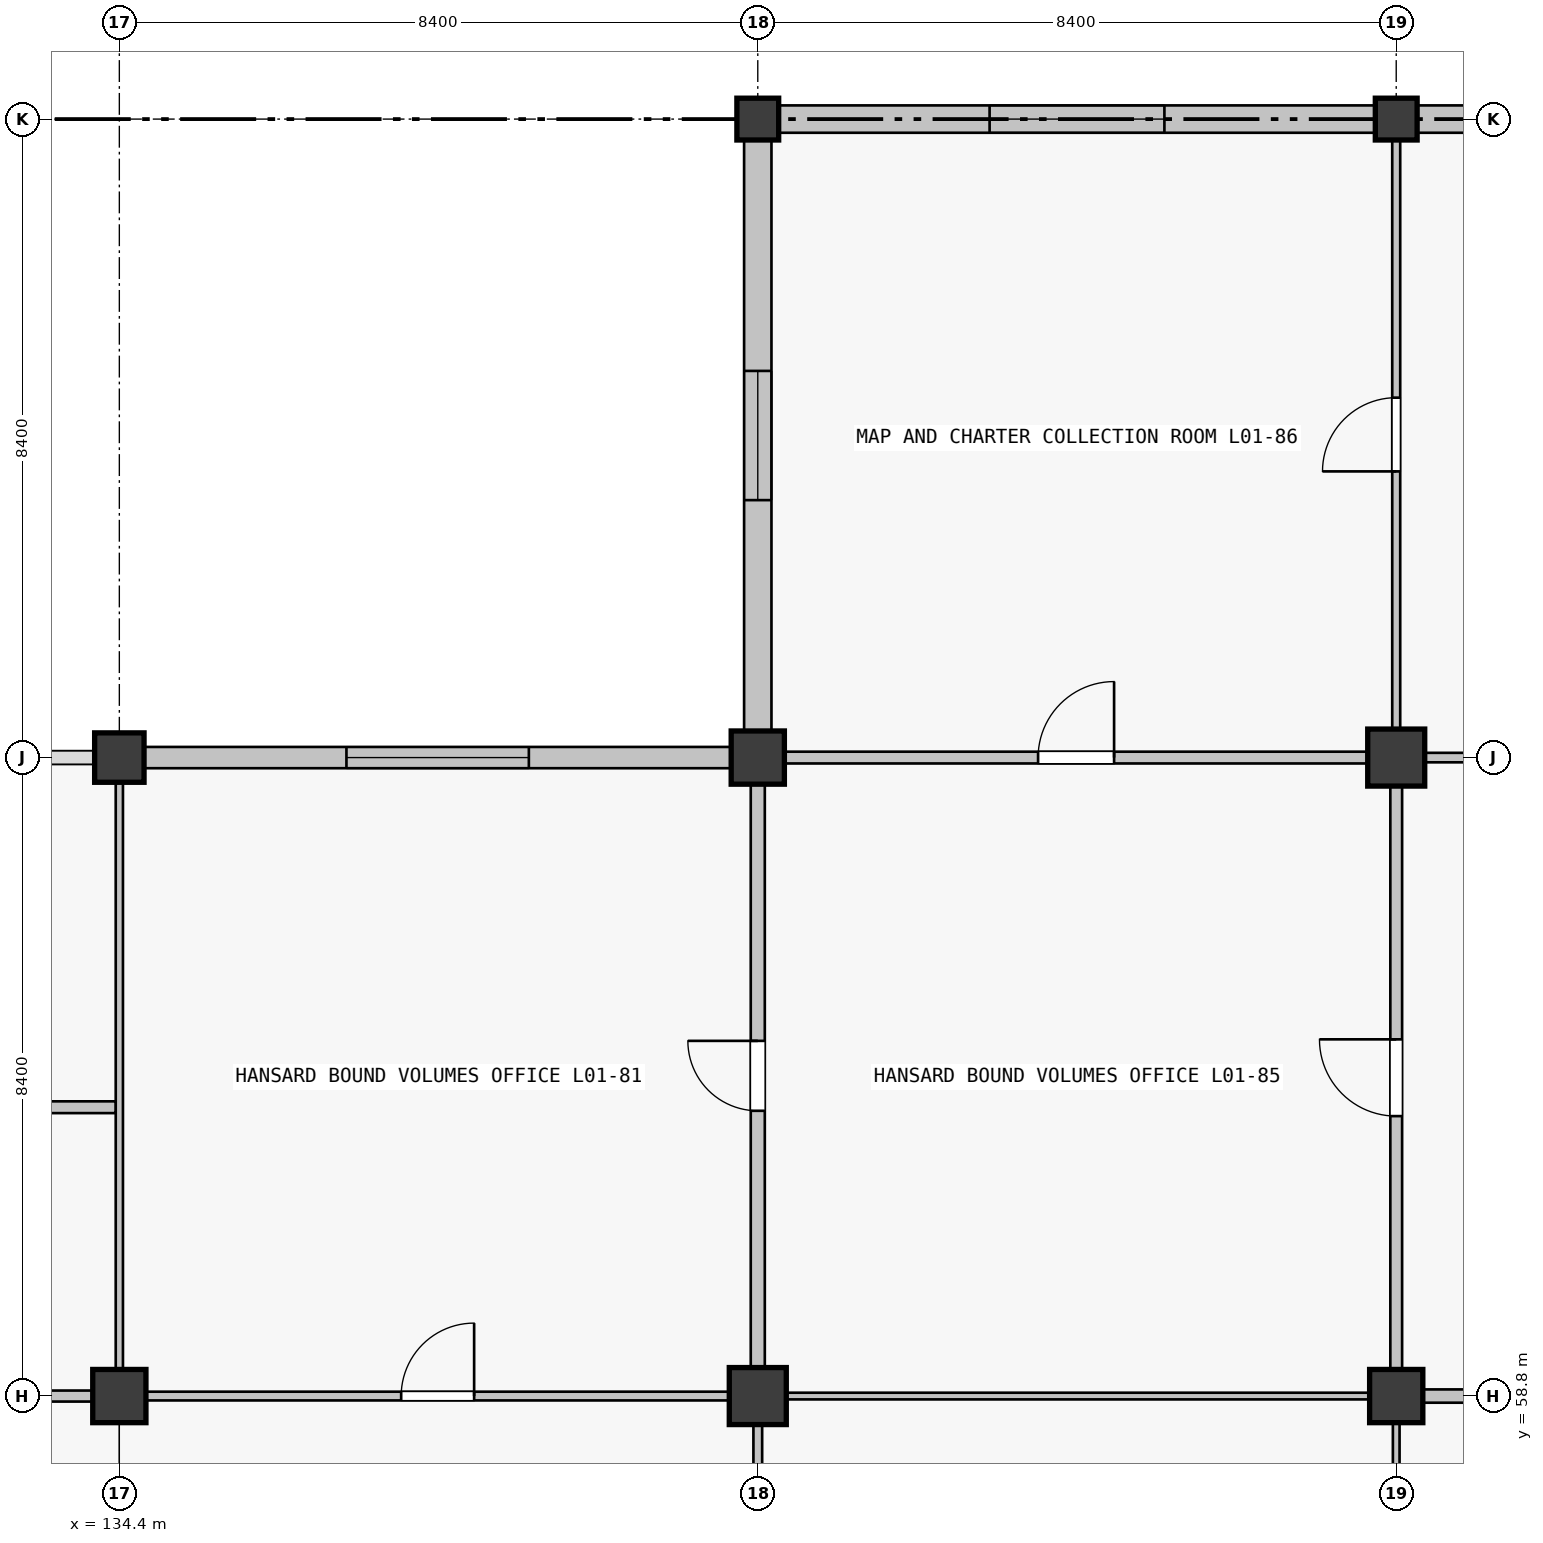
"""IFC4 building model, lengths in metres.
Left out: names, types, materials, properties, quantities, classifications, styles, units other than length and angle.
Written with IfcOpenShell. Run it as: python <this file> out.ifc"""

import sys

from ifc_helpers import new_model, si_unit, direction, frame, frame_2d, origin, origin_2d, place, context, subcontext, project, spatial, rectangle, extrude, element, fill, save


model = new_model("IFC4")
c1 = context("Model", 3, precision=1e-05, world=origin(), true_north=direction((0.0, 1.0)))
c2 = subcontext(c1, "Body", "Model", "MODEL_VIEW")
j1 = project(units=[si_unit("LENGTHUNIT", "METRE"), si_unit("PLANEANGLEUNIT", "RADIAN")], contexts=[c1])
p1 = place(None, origin())
s1 = spatial("IfcSite", under=j1, at=p1, CompositionType="ELEMENT")
p2 = place(p1, origin())
s2 = spatial("IfcBuilding", under=s1, at=p2, CompositionType="ELEMENT")
p3 = place(p2, frame((0.0, 0.0, 5.76)))
s3 = spatial("IfcBuildingStorey", under=s2, at=p3, CompositionType="ELEMENT", Elevation=5.76)
p4 = place(p3, frame((134.4, 58.8, 0.0), z_axis=(0.0, 0.0, 1.0), x_axis=(1.0, 0.0, 0.0)))
e1 = element("IfcColumn", 1, at=p4, inside=s3, PredefinedType="COLUMN", context=c2, shape_type="SweptSolid", body=[
    extrude(rectangle(XDim=0.7, YDim=0.7, at=origin_2d()), origin(), (0.0, 0.0, 1.0), 4.5),
])
p5 = place(p3, frame((134.4, 67.2, 0.0), z_axis=(0.0, 0.0, 1.0), x_axis=(1.0, 0.0, 0.0)))
e2 = element("IfcColumn", 2, at=p5, inside=s3, PredefinedType="COLUMN", context=c2, shape_type="SweptSolid", body=[
    extrude(rectangle(XDim=0.65, YDim=0.65, at=origin_2d()), origin(), (0.0, 0.0, 1.0), 4.5),
])
p6 = place(p3, frame((142.8, 58.8, 0.0), z_axis=(0.0, 0.0, 1.0), x_axis=(1.0, 0.0, 0.0)))
e3 = element("IfcColumn", 3, at=p6, inside=s3, PredefinedType="COLUMN", context=c2, shape_type="SweptSolid", body=[
    extrude(rectangle(XDim=0.75, YDim=0.75, at=origin_2d()), origin(), (0.0, 0.0, 1.0), 4.5),
])
p7 = place(p3, frame((142.8, 67.2, 0.0), z_axis=(0.0, 0.0, 1.0), x_axis=(1.0, 0.0, 0.0)))
e4 = element("IfcColumn", 4, at=p7, inside=s3, PredefinedType="COLUMN", context=c2, shape_type="SweptSolid", body=[
    extrude(rectangle(XDim=0.7, YDim=0.7, at=origin_2d()), origin(), (0.0, 0.0, 1.0), 4.5),
])
p8 = place(p3, frame((142.8, 75.6, 0.0), z_axis=(0.0, 0.0, 1.0), x_axis=(1.0, 0.0, 0.0)))
e5 = element("IfcColumn", 5, at=p8, inside=s3, PredefinedType="COLUMN", context=c2, shape_type="SweptSolid", body=[
    extrude(rectangle(XDim=0.55, YDim=0.55, at=origin_2d()), origin(), (0.0, 0.0, 1.0), 4.2),
])
p9 = place(p3, frame((151.2, 58.8, 0.0), z_axis=(0.0, 0.0, 1.0), x_axis=(1.0, 0.0, 0.0)))
e6 = element("IfcColumn", 6, at=p9, inside=s3, PredefinedType="COLUMN", context=c2, shape_type="SweptSolid", body=[
    extrude(rectangle(XDim=0.7, YDim=0.7, at=origin_2d()), origin(), (0.0, 0.0, 1.0), 4.5),
])
p10 = place(p3, frame((151.2, 67.2, 0.0), z_axis=(0.0, 0.0, 1.0), x_axis=(1.0, 0.0, 0.0)))
e7 = element("IfcColumn", 7, at=p10, inside=s3, PredefinedType="COLUMN", context=c2, shape_type="SweptSolid", body=[
    extrude(rectangle(XDim=0.75, YDim=0.75, at=origin_2d()), origin(), (0.0, 0.0, 1.0), 4.5),
])
p11 = place(p3, frame((151.2, 75.6, 0.0), z_axis=(0.0, 0.0, 1.0), x_axis=(1.0, 0.0, 0.0)))
e8 = element("IfcColumn", 8, at=p11, inside=s3, PredefinedType="COLUMN", context=c2, shape_type="SweptSolid", body=[
    extrude(rectangle(XDim=0.55, YDim=0.55, at=origin_2d()), origin(), (0.0, 0.0, 1.0), 4.2),
])
p12 = place(p3, frame((134.726, 67.2, 0.0), z_axis=(0.0, 0.0, 1.0), x_axis=(1.0, 0.0, 0.0)))
e9 = element("IfcWall", 9, at=p12, inside=s3, PredefinedType="SOLIDWALL", context=c2, shape_type="SweptSolid", body=[
    extrude(rectangle(XDim=7.723, YDim=0.28, at=frame_2d((3.861, 0.0))), origin(), (0.0, 0.0, 1.0), 3.4),
])
p13 = place(p12, frame((2.662, 0.0, 0.9)))
e10 = element("IfcOpeningElement", 10, at=p13, cuts=e9, PredefinedType="OPENING", context=c2, shape_type="SweptSolid", body=[
    extrude(rectangle(XDim=2.4, YDim=2.25, at=frame_2d((1.2, 1.125))), frame((0.0, 0.14, 0.0), z_axis=(0.0, -1.0, 0.0), x_axis=(1.0, 0.0, 0.0)), (0.0, 0.0, 1.0), 0.28),
])
p14 = place(p3, frame((142.8, 67.551, 0.0), z_axis=(0.0, 0.0, 1.0), x_axis=(0.0, 1.0, 0.0)))
e11 = element("IfcWall", 11, at=p14, inside=s3, PredefinedType="SOLIDWALL", context=c2, shape_type="SweptSolid", body=[
    extrude(rectangle(XDim=7.773, YDim=0.36, at=frame_2d((3.886, 0.0))), origin(), (0.0, 0.0, 1.0), 3.4),
])
p15 = place(p14, frame((3.036, 0.0, 0.9)))
e12 = element("IfcOpeningElement", 12, at=p15, cuts=e11, PredefinedType="OPENING", context=c2, shape_type="SweptSolid", body=[
    extrude(rectangle(XDim=1.7, YDim=1.85, at=frame_2d((0.85, 0.925))), frame((0.0, 0.18, 0.0), z_axis=(0.0, -1.0, 0.0), x_axis=(1.0, 0.0, 0.0)), (0.0, 0.0, 1.0), 0.36),
])
p16 = place(p3, frame((143.076, 75.6, 0.0), z_axis=(0.0, 0.0, 1.0), x_axis=(1.0, 0.0, 0.0)))
e13 = element("IfcWall", 13, at=p16, inside=s3, PredefinedType="SOLIDWALL", context=c2, shape_type="SweptSolid", body=[
    extrude(rectangle(XDim=7.848, YDim=0.36, at=frame_2d((3.924, 0.0))), origin(), (0.0, 0.0, 1.0), 3.4),
])
p17 = place(p16, frame((2.774, 0.0, 0.9)))
e14 = element("IfcOpeningElement", 14, at=p17, cuts=e13, PredefinedType="OPENING", context=c2, shape_type="SweptSolid", body=[
    extrude(rectangle(XDim=2.3, YDim=1.85, at=frame_2d((1.15, 0.925))), frame((0.0, 0.18, 0.0), z_axis=(0.0, -1.0, 0.0), x_axis=(1.0, 0.0, 0.0)), (0.0, 0.0, 1.0), 0.36),
])
p18 = place(p3, frame((151.476, 75.6, 0.0), z_axis=(0.0, 0.0, 1.0), x_axis=(1.0, 0.0, 0.0)))
e15 = element("IfcWall", 15, at=p18, inside=s3, PredefinedType="SOLIDWALL", context=c2, shape_type="SweptSolid", body=[
    extrude(rectangle(XDim=7.848, YDim=0.36, at=frame_2d((3.924, 0.0))), origin(), (0.0, 0.0, 1.0), 3.4),
])
p19 = place(p18, frame((2.474, 0.0, 0.9)))
e16 = element("IfcOpeningElement", 16, at=p19, cuts=e15, PredefinedType="OPENING", context=c2, shape_type="SweptSolid", body=[
    extrude(rectangle(XDim=2.9, YDim=1.85, at=frame_2d((1.45, 0.925))), frame((0.0, 0.18, 0.0), z_axis=(0.0, -1.0, 0.0), x_axis=(1.0, 0.0, 0.0)), (0.0, 0.0, 1.0), 0.36),
])
p20 = place(p3, frame((126.377, 58.8, 0.0), z_axis=(0.0, 0.0, 1.0), x_axis=(1.0, 0.0, 0.0)))
e17 = element("IfcWall", 17, at=p20, inside=s3, PredefinedType="PARTITIONING", context=c2, shape_type="SweptSolid", body=[
    extrude(rectangle(XDim=7.671, YDim=0.145, at=frame_2d((3.835, 0.0))), origin(), (0.0, 0.0, 1.0), 2.4),
])
p21 = place(p3, frame((134.752, 58.8, 0.0), z_axis=(0.0, 0.0, 1.0), x_axis=(1.0, 0.0, 0.0)))
e18 = element("IfcWall", 18, at=p21, inside=s3, PredefinedType="PARTITIONING", context=c2, shape_type="SweptSolid", body=[
    extrude(rectangle(XDim=7.671, YDim=0.115, at=frame_2d((3.835, 0.0))), origin(), (0.0, 0.0, 1.0), 2.4),
])
p22 = place(p21, frame((3.356, 0.0, 0.0)))
e19 = element("IfcOpeningElement", 19, at=p22, cuts=e18, PredefinedType="OPENING", context=c2, shape_type="SweptSolid", body=[
    extrude(rectangle(XDim=0.96, YDim=2.18, at=frame_2d((0.48, 1.09))), frame((0.0, 0.058, 0.0), z_axis=(0.0, -1.0, 0.0), x_axis=(1.0, 0.0, 0.0)), (0.0, 0.0, 1.0), 0.115),
])
p23 = place(p3, frame((143.177, 58.8, 0.0), z_axis=(0.0, 0.0, 1.0), x_axis=(1.0, 0.0, 0.0)))
e20 = element("IfcWall", 20, at=p23, inside=s3, PredefinedType="PARTITIONING", context=c2, shape_type="SweptSolid", body=[
    extrude(rectangle(XDim=7.671, YDim=0.088, at=frame_2d((3.835, 0.0))), origin(), (0.0, 0.0, 1.0), 2.4),
])
p24 = place(p3, frame((143.152, 67.2, 0.0), z_axis=(0.0, 0.0, 1.0), x_axis=(1.0, 0.0, 0.0)))
e21 = element("IfcWall", 21, at=p24, inside=s3, PredefinedType="PARTITIONING", context=c2, shape_type="SweptSolid", body=[
    extrude(rectangle(XDim=7.671, YDim=0.155, at=frame_2d((3.835, 0.0))), origin(), (0.0, 0.0, 1.0), 2.4),
])
p25 = place(p24, frame((3.336, 0.0, 0.0)))
e22 = element("IfcOpeningElement", 22, at=p25, cuts=e21, PredefinedType="OPENING", context=c2, shape_type="SweptSolid", body=[
    extrude(rectangle(XDim=1.0, YDim=2.2, at=frame_2d((0.5, 1.1))), frame((0.0, 0.078, 0.0), z_axis=(0.0, -1.0, 0.0), x_axis=(1.0, 0.0, 0.0)), (0.0, 0.0, 1.0), 0.155),
])
p26 = place(p3, frame((151.552, 58.8, 0.0), z_axis=(0.0, 0.0, 1.0), x_axis=(1.0, 0.0, 0.0)))
e23 = element("IfcWall", 23, at=p26, inside=s3, PredefinedType="PARTITIONING", context=c2, shape_type="SweptSolid", body=[
    extrude(rectangle(XDim=7.671, YDim=0.175, at=frame_2d((3.835, 0.0))), origin(), (0.0, 0.0, 1.0), 2.4),
])
p27 = place(p26, frame((3.376, 0.0, 0.0)))
e24 = element("IfcOpeningElement", 24, at=p27, cuts=e23, PredefinedType="OPENING", context=c2, shape_type="SweptSolid", body=[
    extrude(rectangle(XDim=0.92, YDim=2.15, at=frame_2d((0.46, 1.075))), frame((0.0, 0.087, 0.0), z_axis=(0.0, -1.0, 0.0), x_axis=(1.0, 0.0, 0.0)), (0.0, 0.0, 1.0), 0.175),
])
p28 = place(p3, frame((151.577, 67.2, 0.0), z_axis=(0.0, 0.0, 1.0), x_axis=(1.0, 0.0, 0.0)))
e25 = element("IfcWall", 25, at=p28, inside=s3, PredefinedType="PARTITIONING", context=c2, shape_type="SweptSolid", body=[
    extrude(rectangle(XDim=7.671, YDim=0.125, at=frame_2d((3.835, 0.0))), origin(), (0.0, 0.0, 1.0), 2.4),
])
p29 = place(p28, frame((3.311, 0.0, 0.0)))
e26 = element("IfcOpeningElement", 26, at=p29, cuts=e25, PredefinedType="OPENING", context=c2, shape_type="SweptSolid", body=[
    extrude(rectangle(XDim=1.05, YDim=2.12, at=frame_2d((0.525, 1.06))), frame((0.0, 0.062, 0.0), z_axis=(0.0, -1.0, 0.0), x_axis=(1.0, 0.0, 0.0)), (0.0, 0.0, 1.0), 0.125),
])
p30 = place(p3, frame((134.4, 59.152, 0.0), z_axis=(0.0, 0.0, 1.0), x_axis=(0.0, 1.0, 0.0)))
e27 = element("IfcWall", 27, at=p30, inside=s3, PredefinedType="PARTITIONING", context=c2, shape_type="SweptSolid", body=[
    extrude(rectangle(XDim=7.721, YDim=0.095, at=frame_2d((3.86, 0.0))), origin(), (0.0, 0.0, 1.0), 2.4),
])
p31 = place(p3, frame((142.8, 50.752, 0.0), z_axis=(0.0, 0.0, 1.0), x_axis=(0.0, 1.0, 0.0)))
e28 = element("IfcWall", 28, at=p31, inside=s3, PredefinedType="PARTITIONING", context=c2, shape_type="SweptSolid", body=[
    extrude(rectangle(XDim=7.671, YDim=0.115, at=frame_2d((3.835, 0.0))), origin(), (0.0, 0.0, 1.0), 2.4),
])
p32 = place(p31, frame((0.623, 0.0, 0.0)))
e29 = element("IfcOpeningElement", 29, at=p32, cuts=e28, PredefinedType="OPENING", context=c2, shape_type="SweptSolid", body=[
    extrude(rectangle(XDim=0.98, YDim=2.08, at=frame_2d((0.49, 1.04))), frame((0.0, 0.058, 0.0), z_axis=(0.0, -1.0, 0.0), x_axis=(1.0, 0.0, 0.0)), (0.0, 0.0, 1.0), 0.115),
])
p33 = place(p31, frame((4.563, 0.0, 0.0)))
e30 = element("IfcOpeningElement", 30, at=p33, cuts=e28, PredefinedType="OPENING", context=c2, shape_type="SweptSolid", body=[
    extrude(rectangle(XDim=0.94, YDim=2.08, at=frame_2d((0.47, 1.04))), frame((0.0, 0.058, 0.0), z_axis=(0.0, -1.0, 0.0), x_axis=(1.0, 0.0, 0.0)), (0.0, 0.0, 1.0), 0.115),
])
p34 = place(p3, frame((142.8, 59.177, 0.0), z_axis=(0.0, 0.0, 1.0), x_axis=(0.0, 1.0, 0.0)))
e31 = element("IfcWall", 31, at=p34, inside=s3, PredefinedType="PARTITIONING", context=c2, shape_type="SweptSolid", body=[
    extrude(rectangle(XDim=7.671, YDim=0.185, at=frame_2d((3.835, 0.0))), origin(), (0.0, 0.0, 1.0), 2.4),
])
p35 = place(p34, frame((3.376, 0.0, 0.0)))
e32 = element("IfcOpeningElement", 32, at=p35, cuts=e31, PredefinedType="OPENING", context=c2, shape_type="SweptSolid", body=[
    extrude(rectangle(XDim=0.92, YDim=2.15, at=frame_2d((0.46, 1.075))), frame((0.0, 0.093, 0.0), z_axis=(0.0, -1.0, 0.0), x_axis=(1.0, 0.0, 0.0)), (0.0, 0.0, 1.0), 0.185),
])
p36 = place(p3, frame((151.2, 50.777, 0.0), z_axis=(0.0, 0.0, 1.0), x_axis=(0.0, 1.0, 0.0)))
e33 = element("IfcWall", 33, at=p36, inside=s3, PredefinedType="PARTITIONING", context=c2, shape_type="SweptSolid", body=[
    extrude(rectangle(XDim=7.671, YDim=0.088, at=frame_2d((3.835, 0.0))), origin(), (0.0, 0.0, 1.0), 2.4),
])
p37 = place(p3, frame((151.2, 59.152, 0.0), z_axis=(0.0, 0.0, 1.0), x_axis=(0.0, 1.0, 0.0)))
e34 = element("IfcWall", 34, at=p37, inside=s3, PredefinedType="PARTITIONING", context=c2, shape_type="SweptSolid", body=[
    extrude(rectangle(XDim=7.671, YDim=0.155, at=frame_2d((3.835, 0.0))), origin(), (0.0, 0.0, 1.0), 2.4),
])
p38 = place(p37, frame((3.331, 0.0, 0.0)))
e35 = element("IfcOpeningElement", 35, at=p38, cuts=e34, PredefinedType="OPENING", context=c2, shape_type="SweptSolid", body=[
    extrude(rectangle(XDim=1.01, YDim=2.12, at=frame_2d((0.505, 1.06))), frame((0.0, 0.078, 0.0), z_axis=(0.0, -1.0, 0.0), x_axis=(1.0, 0.0, 0.0)), (0.0, 0.0, 1.0), 0.155),
])
p39 = place(p3, frame((151.2, 67.577, 0.0), z_axis=(0.0, 0.0, 1.0), x_axis=(0.0, 1.0, 0.0)))
e36 = element("IfcWall", 36, at=p39, inside=s3, PredefinedType="PARTITIONING", context=c2, shape_type="SweptSolid", body=[
    extrude(rectangle(XDim=7.746, YDim=0.105, at=frame_2d((3.873, 0.0))), origin(), (0.0, 0.0, 1.0), 2.4),
])
p40 = place(p39, frame((3.388, 0.0, 0.0)))
e37 = element("IfcOpeningElement", 37, at=p40, cuts=e36, PredefinedType="OPENING", context=c2, shape_type="SweptSolid", body=[
    extrude(rectangle(XDim=0.97, YDim=2.12, at=frame_2d((0.485, 1.06))), frame((0.0, 0.052, 0.0), z_axis=(0.0, -1.0, 0.0), x_axis=(1.0, 0.0, 0.0)), (0.0, 0.0, 1.0), 0.105),
])
p41 = place(p3, frame((126.064, 62.6, 0.0), z_axis=(0.0, 0.0, 1.0), x_axis=(1.0, 0.0, 0.0)))
e38 = element("IfcWall", 38, at=p41, inside=s3, PredefinedType="PARTITIONING", context=c2, shape_type="SweptSolid", body=[
    extrude(rectangle(XDim=8.286, YDim=0.155, at=frame_2d((4.143, 0.0))), origin(), (0.0, 0.0, 1.0), 2.4),
])
p42 = place(p13, origin())
e39 = element("IfcWindow", 39, at=p42, inside=s3, PartitioningType="SINGLE_PANEL", PredefinedType="WINDOW", context=c2, shape_type="SweptSolid", body=[
    extrude(rectangle(XDim=2.4, YDim=2.25, at=frame_2d((1.2, 1.125))), frame((0.0, 0.03, 0.0), z_axis=(0.0, -1.0, 0.0), x_axis=(1.0, 0.0, 0.0)), (0.0, 0.0, 1.0), 0.06),
])
fill(e10, e39)
p43 = place(p15, origin())
e40 = element("IfcWindow", 40, at=p43, inside=s3, PartitioningType="SINGLE_PANEL", PredefinedType="WINDOW", context=c2, shape_type="SweptSolid", body=[
    extrude(rectangle(XDim=1.7, YDim=1.85, at=frame_2d((0.85, 0.925))), frame((0.0, 0.03, 0.0), z_axis=(0.0, -1.0, 0.0), x_axis=(1.0, 0.0, 0.0)), (0.0, 0.0, 1.0), 0.06),
])
fill(e12, e40)
p44 = place(p17, origin())
e41 = element("IfcWindow", 41, at=p44, inside=s3, PartitioningType="SINGLE_PANEL", PredefinedType="WINDOW", context=c2, shape_type="SweptSolid", body=[
    extrude(rectangle(XDim=2.3, YDim=1.85, at=frame_2d((1.15, 0.925))), frame((0.0, 0.03, 0.0), z_axis=(0.0, -1.0, 0.0), x_axis=(1.0, 0.0, 0.0)), (0.0, 0.0, 1.0), 0.06),
])
fill(e14, e41)
p45 = place(p22, origin())
e42 = element("IfcDoor", 42, at=p45, inside=s3, OperationType="SINGLE_SWING_RIGHT", PredefinedType="DOOR", context=c2, shape_type="SweptSolid", body=[
    extrude(rectangle(XDim=0.96, YDim=2.18, at=frame_2d((0.48, 1.09))), frame((0.0, 0.025, 0.0), z_axis=(0.0, -1.0, 0.0), x_axis=(1.0, 0.0, 0.0)), (0.0, 0.0, 1.0), 0.05),
])
fill(e19, e42)
p46 = place(p25, origin())
e43 = element("IfcDoor", 43, at=p46, inside=s3, OperationType="SINGLE_SWING_RIGHT", PredefinedType="DOOR", context=c2, shape_type="SweptSolid", body=[
    extrude(rectangle(XDim=1.0, YDim=2.2, at=frame_2d((0.5, 1.1))), frame((0.0, 0.025, 0.0), z_axis=(0.0, -1.0, 0.0), x_axis=(1.0, 0.0, 0.0)), (0.0, 0.0, 1.0), 0.05),
])
fill(e22, e43)
p47 = place(p35, origin())
e44 = element("IfcDoor", 44, at=p47, inside=s3, OperationType="SINGLE_SWING_RIGHT", PredefinedType="DOOR", context=c2, shape_type="SweptSolid", body=[
    extrude(rectangle(XDim=0.92, YDim=2.15, at=frame_2d((0.46, 1.075))), frame((0.0, 0.025, 0.0), z_axis=(0.0, -1.0, 0.0), x_axis=(1.0, 0.0, 0.0)), (0.0, 0.0, 1.0), 0.05),
])
fill(e32, e44)
p48 = place(p38, origin())
e45 = element("IfcDoor", 45, at=p48, inside=s3, OperationType="SINGLE_SWING_RIGHT", PredefinedType="DOOR", context=c2, shape_type="SweptSolid", body=[
    extrude(rectangle(XDim=1.01, YDim=2.12, at=frame_2d((0.505, 1.06))), frame((0.0, 0.025, 0.0), z_axis=(0.0, -1.0, 0.0), x_axis=(1.0, 0.0, 0.0)), (0.0, 0.0, 1.0), 0.05),
])
fill(e35, e45)
p49 = place(p40, origin())
e46 = element("IfcDoor", 46, at=p49, inside=s3, OperationType="SINGLE_SWING_LEFT", PredefinedType="DOOR", context=c2, shape_type="SweptSolid", body=[
    extrude(rectangle(XDim=0.97, YDim=2.12, at=frame_2d((0.485, 1.06))), frame((0.0, 0.025, 0.0), z_axis=(0.0, -1.0, 0.0), x_axis=(1.0, 0.0, 0.0)), (0.0, 0.0, 1.0), 0.05),
])
fill(e37, e46)
save(model, sys.argv[1])
